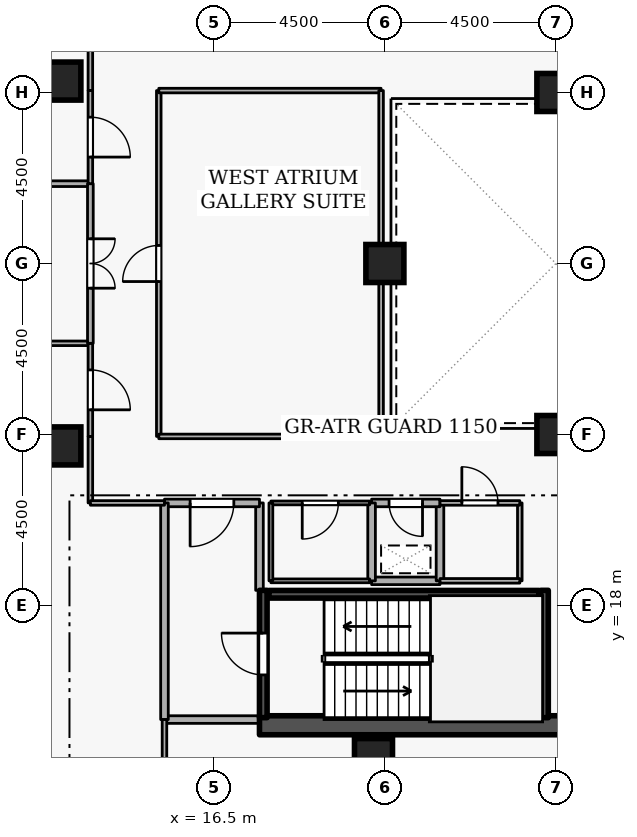
"""IFC4 building model, lengths in metres.
Left out: names, types, materials, properties, quantities, classifications, styles, units other than length and angle.
Written with IfcOpenShell. Run it as: python <this file> out.ifc"""

import sys

from ifc_helpers import new_model, si_unit, direction, frame, frame_2d, origin, origin_2d, place, context, subcontext, project, spatial, rectangle, extrude, element, fill, save


model = new_model("IFC4")
c1 = context("Model", 3, precision=1e-05, world=origin(), true_north=direction((0.0, 1.0)))
c2 = subcontext(c1, "Body", "Model", "MODEL_VIEW")
j1 = project(units=[si_unit("LENGTHUNIT", "METRE"), si_unit("PLANEANGLEUNIT", "RADIAN")], contexts=[c1])
p1 = place(None, origin())
s1 = spatial("IfcSite", under=j1, at=p1, CompositionType="ELEMENT")
p2 = place(p1, origin())
s2 = spatial("IfcBuilding", under=s1, at=p2, CompositionType="ELEMENT")
p3 = place(p2, frame((0.0, 0.0, 233.1)))
s3 = spatial("IfcBuildingStorey", under=s2, at=p3, CompositionType="ELEMENT", Elevation=233.1)
p4 = place(p3, frame((17.7, 14.85, 0.0), z_axis=(0.0, 0.0, 1.0), x_axis=(1.0, 0.0, 0.0)))
e1 = element("IfcWall", 1, at=p4, inside=s3, PredefinedType="SHEAR", context=c2, shape_type="SweptSolid", body=[
    extrude(rectangle(XDim=15.6, YDim=0.5, at=frame_2d((7.8, 0.0))), origin(), (0.0, 0.0, 1.0), 3.6),
])
for number, where, z_axis, x_axis in (
    (2, (12.5, 22.2, 0.0), (0.0, 0.0, 1.0), (1.0, 0.0, 0.0)),
    (3, (12.5, 31.8, 0.0), (0.0, 0.0, 1.0), (1.0, 0.0, 0.0)),
    (4, (20.7, 14.0, 0.0), (0.0, 0.0, 1.0), (1.0, 0.0, 0.0)),
    (5, (25.5, 22.5, 0.0), (0.0, 0.0, 1.0), (1.0, 0.0, 0.0)),
    (6, (25.5, 31.5, 0.0), (0.0, 0.0, 1.0), (1.0, 0.0, 0.0)),
    (7, (21.0, 27.0, 0.0), (0.0, 0.0, 1.0), (1.0, 0.0, 0.0)),
):
    element("IfcColumn", number, at=place(p3, frame(where, z_axis=z_axis, x_axis=x_axis)), inside=s3, PredefinedType="COLUMN", context=c2, shape_type="SweptSolid", body=[
        extrude(rectangle(XDim=1.0, YDim=1.0, at=origin_2d()), origin(), (0.0, 0.0, 1.0), 3.6),
    ])
p5 = place(p3, frame((17.8, 15.05, 0.0), z_axis=(0.0, 0.0, 1.0), x_axis=(0.0, 1.0, 0.0)))
e8 = element("IfcWall", 8, at=p5, inside=s3, PredefinedType="SHEAR", context=c2, shape_type="SweptSolid", body=[
    extrude(rectangle(XDim=3.35, YDim=0.2, at=frame_2d((1.675, 0.0))), origin(), (0.0, 0.0, 1.0), 3.6),
])
p6 = place(p5, frame((1.125, 0.0, 0.0)))
e9 = element("IfcOpeningElement", 9, at=p6, cuts=e8, PredefinedType="OPENING", context=c2, shape_type="SweptSolid", body=[
    extrude(rectangle(XDim=1.1, YDim=2.1, at=frame_2d((0.55, 1.05))), frame((0.0, 0.11, 0.0), z_axis=(0.0, -1.0, 0.0), x_axis=(1.0, 0.0, 0.0)), (0.0, 0.0, 1.0), 0.22),
])
p7 = place(p3, frame((25.2, 18.4, 0.0), z_axis=(0.0, 0.0, 1.0), x_axis=(0.0, -1.0, 0.0)))
e10 = element("IfcWall", 10, at=p7, inside=s3, PredefinedType="SHEAR", context=c2, shape_type="SweptSolid", body=[
    extrude(rectangle(XDim=3.35, YDim=0.2, at=frame_2d((1.675, 0.0))), origin(), (0.0, 0.0, 1.0), 3.6),
])
p8 = place(p3, frame((25.05, 18.297, 0.0), z_axis=(0.0, 0.0, 1.0), x_axis=(-1.0, 0.0, 0.0)))
e11 = element("IfcWall", 11, at=p8, inside=s3, PredefinedType="SHEAR", context=c2, shape_type="SweptSolid", body=[
    extrude(rectangle(XDim=7.1, YDim=0.2, at=frame_2d((3.55, 0.0))), origin(), (0.0, 0.0, 1.0), 3.6),
])
p9 = place(p3, frame((15.2, 15.0, 0.0), z_axis=(0.0, 0.0, 1.0), x_axis=(1.0, 0.0, 0.0)))
e12 = element("IfcWall", 12, at=p9, inside=s3, PredefinedType="STANDARD", context=c2, shape_type="SweptSolid", body=[
    extrude(rectangle(XDim=2.5, YDim=0.2, at=frame_2d((1.25, 0.0))), origin(), (0.0, 0.0, 1.0), 3.34),
])
p10 = place(p3, frame((17.7, 18.4, 0.0), z_axis=(0.0, 0.0, 1.0), x_axis=(0.0, 1.0, 0.0)))
e13 = element("IfcWall", 13, at=p10, inside=s3, PredefinedType="STANDARD", context=c2, shape_type="SweptSolid", body=[
    extrude(rectangle(XDim=2.3, YDim=0.2, at=frame_2d((1.15, 0.0))), origin(), (0.0, 0.0, 1.0), 2.545),
])
p11 = place(p3, frame((17.7, 20.7, 0.0), z_axis=(0.0, 0.0, 1.0), x_axis=(-1.0, 0.0, 0.0)))
e14 = element("IfcWall", 14, at=p11, inside=s3, PredefinedType="STANDARD", context=c2, shape_type="SweptSolid", body=[
    extrude(rectangle(XDim=2.5, YDim=0.2, at=frame_2d((1.25, 0.0))), origin(), (0.0, 0.0, 1.0), 3.34),
])
p12 = place(p11, frame((0.675, 0.0, 0.0)))
e15 = element("IfcOpeningElement", 15, at=p12, cuts=e14, PredefinedType="OPENING", context=c2, shape_type="SweptSolid", body=[
    extrude(rectangle(XDim=1.15, YDim=2.1, at=frame_2d((0.575, 1.05))), frame((0.0, 0.11, 0.0), z_axis=(0.0, -1.0, 0.0), x_axis=(1.0, 0.0, 0.0)), (0.0, 0.0, 1.0), 0.22),
])
p13 = place(p3, frame((15.2, 20.7, 0.0), z_axis=(0.0, 0.0, 1.0), x_axis=(0.0, -1.0, 0.0)))
e16 = element("IfcWall", 16, at=p13, inside=s3, PredefinedType="STANDARD", context=c2, shape_type="SweptSolid", body=[
    extrude(rectangle(XDim=5.7, YDim=0.2, at=frame_2d((2.85, 0.0))), origin(), (0.0, 0.0, 1.0), 3.34),
])
p14 = place(p3, frame((20.65, 18.65, 0.0), z_axis=(0.0, 0.0, 1.0), x_axis=(1.0, 0.0, 0.0)))
e17 = element("IfcWall", 17, at=p14, inside=s3, PredefinedType="STANDARD", context=c2, shape_type="SweptSolid", body=[
    extrude(rectangle(XDim=1.8, YDim=0.2, at=frame_2d((0.9, 0.0))), origin(), (0.0, 0.0, 1.0), 3.34),
])
p15 = place(p3, frame((22.45, 18.65, 0.0), z_axis=(0.0, 0.0, 1.0), x_axis=(0.0, 1.0, 0.0)))
e18 = element("IfcWall", 18, at=p15, inside=s3, PredefinedType="STANDARD", context=c2, shape_type="SweptSolid", body=[
    extrude(rectangle(XDim=2.05, YDim=0.2, at=frame_2d((1.025, 0.0))), origin(), (0.0, 0.0, 1.0), 3.34),
])
p16 = place(p3, frame((22.45, 20.7, 0.0), z_axis=(0.0, 0.0, 1.0), x_axis=(-1.0, 0.0, 0.0)))
e19 = element("IfcWall", 19, at=p16, inside=s3, PredefinedType="STANDARD", context=c2, shape_type="SweptSolid", body=[
    extrude(rectangle(XDim=1.8, YDim=0.2, at=frame_2d((0.9, 0.0))), origin(), (0.0, 0.0, 1.0), 3.34),
])
p17 = place(p16, frame((0.46, 0.0, 0.0)))
e20 = element("IfcOpeningElement", 20, at=p17, cuts=e19, PredefinedType="OPENING", context=c2, shape_type="SweptSolid", body=[
    extrude(rectangle(XDim=0.88, YDim=2.04, at=frame_2d((0.44, 1.02))), frame((0.0, 0.11, 0.0), z_axis=(0.0, -1.0, 0.0), x_axis=(1.0, 0.0, 0.0)), (0.0, 0.0, 1.0), 0.22),
])
p18 = place(p3, frame((20.65, 20.7, 0.0), z_axis=(0.0, 0.0, 1.0), x_axis=(0.0, -1.0, 0.0)))
e21 = element("IfcWall", 21, at=p18, inside=s3, PredefinedType="STANDARD", context=c2, shape_type="SweptSolid", body=[
    extrude(rectangle(XDim=2.05, YDim=0.2, at=frame_2d((1.025, 0.0))), origin(), (0.0, 0.0, 1.0), 3.34),
])
p19 = place(p3, frame((18.0, 18.65, 0.0), z_axis=(0.0, 0.0, 1.0), x_axis=(1.0, 0.0, 0.0)))
e22 = element("IfcWall", 22, at=p19, inside=s3, PredefinedType="PARTITIONING", context=c2, shape_type="SweptSolid", body=[
    extrude(rectangle(XDim=2.6, YDim=0.1, at=frame_2d((1.3, 0.0))), origin(), (0.0, 0.0, 1.0), 3.34),
])
p20 = place(p3, frame((20.6, 20.7, 0.0), z_axis=(0.0, 0.0, 1.0), x_axis=(-1.0, 0.0, 0.0)))
e23 = element("IfcWall", 23, at=p20, inside=s3, PredefinedType="PARTITIONING", context=c2, shape_type="SweptSolid", body=[
    extrude(rectangle(XDim=2.6, YDim=0.1, at=frame_2d((1.3, 0.0))), origin(), (0.0, 0.0, 1.0), 3.34),
])
p21 = place(p20, frame((0.825, 0.0, 0.0)))
e24 = element("IfcOpeningElement", 24, at=p21, cuts=e23, PredefinedType="OPENING", context=c2, shape_type="SweptSolid", body=[
    extrude(rectangle(XDim=0.95, YDim=2.1, at=frame_2d((0.475, 1.05))), frame((0.0, 0.06, 0.0), z_axis=(0.0, -1.0, 0.0), x_axis=(1.0, 0.0, 0.0)), (0.0, 0.0, 1.0), 0.12),
])
p22 = place(p3, frame((18.0, 20.7, 0.0), z_axis=(0.0, 0.0, 1.0), x_axis=(0.0, -1.0, 0.0)))
e25 = element("IfcWall", 25, at=p22, inside=s3, PredefinedType="PARTITIONING", context=c2, shape_type="SweptSolid", body=[
    extrude(rectangle(XDim=2.05, YDim=0.1, at=frame_2d((1.025, 0.0))), origin(), (0.0, 0.0, 1.0), 2.545),
])
p23 = place(p3, frame((24.55, 20.7, 0.0), z_axis=(0.0, 0.0, 1.0), x_axis=(0.0, -1.0, 0.0)))
e26 = element("IfcWall", 26, at=p23, inside=s3, PredefinedType="PARTITIONING", context=c2, shape_type="SweptSolid", body=[
    extrude(rectangle(XDim=2.05, YDim=0.12, at=frame_2d((1.025, 0.0))), origin(), (0.0, 0.0, 1.0), 3.34),
])
p24 = place(p3, frame((24.55, 18.65, 0.0), z_axis=(0.0, 0.0, 1.0), x_axis=(-1.0, 0.0, 0.0)))
e27 = element("IfcWall", 27, at=p24, inside=s3, PredefinedType="PARTITIONING", context=c2, shape_type="SweptSolid", body=[
    extrude(rectangle(XDim=2.1, YDim=0.12, at=frame_2d((1.05, 0.0))), origin(), (0.0, 0.0, 1.0), 3.34),
])
p25 = place(p3, frame((22.45, 20.7, 0.0), z_axis=(0.0, 0.0, 1.0), x_axis=(1.0, 0.0, 0.0)))
e28 = element("IfcWall", 28, at=p25, inside=s3, PredefinedType="PARTITIONING", context=c2, shape_type="SweptSolid", body=[
    extrude(rectangle(XDim=2.1, YDim=0.12, at=frame_2d((1.05, 0.0))), origin(), (0.0, 0.0, 1.0), 3.34),
])
p26 = place(p25, frame((0.575, 0.0, 0.0)))
e29 = element("IfcOpeningElement", 29, at=p26, cuts=e28, PredefinedType="OPENING", context=c2, shape_type="SweptSolid", body=[
    extrude(rectangle(XDim=0.95, YDim=2.1, at=frame_2d((0.475, 1.05))), frame((0.0, 0.07, 0.0), z_axis=(0.0, -1.0, 0.0), x_axis=(1.0, 0.0, 0.0)), (0.0, 0.0, 1.0), 0.14),
])
p27 = place(p3, frame((13.25, 22.45, 0.0), z_axis=(0.0, 0.0, 1.0), x_axis=(0.0, -1.0, 0.0)))
e30 = element("IfcWall", 30, at=p27, inside=s3, PredefinedType="PARTITIONING", context=c2, shape_type="SweptSolid", body=[
    extrude(rectangle(XDim=1.75, YDim=0.12, at=frame_2d((0.875, 0.0))), origin(), (0.0, 0.0, 1.0), 3.34),
])
p28 = place(p3, frame((13.25, 20.7, 0.0), z_axis=(0.0, 0.0, 1.0), x_axis=(1.0, 0.0, 0.0)))
e31 = element("IfcWall", 31, at=p28, inside=s3, PredefinedType="PARTITIONING", context=c2, shape_type="SweptSolid", body=[
    extrude(rectangle(XDim=1.95, YDim=0.12, at=frame_2d((0.975, 0.0))), origin(), (0.0, 0.0, 1.0), 3.34),
])
p29 = place(p3, frame((15.2, 15.0, 0.0), z_axis=(0.0, 0.0, 1.0), x_axis=(0.0, -1.0, 0.0)))
e32 = element("IfcWall", 32, at=p29, inside=s3, PredefinedType="PARTITIONING", context=c2, shape_type="SweptSolid", body=[
    extrude(rectangle(XDim=11.72, YDim=0.12, at=frame_2d((5.86, 0.0))), origin(), (0.0, 0.0, 1.0), 3.34),
])
p30 = place(p3, frame((1.78, 24.9, 0.0), z_axis=(0.0, 0.0, 1.0), x_axis=(1.0, 0.0, 0.0)))
e33 = element("IfcWall", 33, at=p30, inside=s3, PredefinedType="PARTITIONING", context=c2, shape_type="SweptSolid", body=[
    extrude(rectangle(XDim=11.47, YDim=0.12, at=frame_2d((5.735, 0.0))), origin(), (0.0, 0.0, 1.0), 3.34),
])
p31 = place(p3, frame((13.25, 24.9, 0.0), z_axis=(0.0, 0.0, 1.0), x_axis=(0.0, -1.0, 0.0)))
e34 = element("IfcWall", 34, at=p31, inside=s3, PredefinedType="PARTITIONING", context=c2, shape_type="SweptSolid", body=[
    extrude(rectangle(XDim=2.45, YDim=0.12, at=frame_2d((1.225, 0.0))), origin(), (0.0, 0.0, 1.0), 3.34),
])
p32 = place(p31, frame((0.7, 0.0, 0.0)))
e35 = element("IfcOpeningElement", 35, at=p32, cuts=e34, PredefinedType="OPENING", context=c2, shape_type="SweptSolid", body=[
    extrude(rectangle(XDim=1.05, YDim=2.1, at=frame_2d((0.525, 1.05))), frame((0.0, 0.07, 0.0), z_axis=(0.0, -1.0, 0.0), x_axis=(1.0, 0.0, 0.0)), (0.0, 0.0, 1.0), 0.14),
])
p33 = place(p3, frame((1.78, 29.1, 0.0), z_axis=(0.0, 0.0, 1.0), x_axis=(1.0, 0.0, 0.0)))
e36 = element("IfcWall", 36, at=p33, inside=s3, PredefinedType="PARTITIONING", context=c2, shape_type="SweptSolid", body=[
    extrude(rectangle(XDim=11.47, YDim=0.15, at=frame_2d((5.735, 0.0))), origin(), (0.0, 0.0, 1.0), 3.34),
])
p34 = place(p3, frame((13.25, 29.1, 0.0), z_axis=(0.0, 0.0, 1.0), x_axis=(0.0, -1.0, 0.0)))
e37 = element("IfcWall", 37, at=p34, inside=s3, PredefinedType="PARTITIONING", context=c2, shape_type="SweptSolid", body=[
    extrude(rectangle(XDim=4.2, YDim=0.15, at=frame_2d((2.1, 0.0))), origin(), (0.0, 0.0, 1.0), 3.34),
])
p35 = place(p34, frame((1.45, 0.0, 0.0)))
e38 = element("IfcOpeningElement", 38, at=p35, cuts=e37, PredefinedType="OPENING", context=c2, shape_type="SweptSolid", body=[
    extrude(rectangle(XDim=1.3, YDim=2.12, at=frame_2d((0.65, 1.06))), frame((0.0, 0.085, 0.0), z_axis=(0.0, -1.0, 0.0), x_axis=(1.0, 0.0, 0.0)), (0.0, 0.0, 1.0), 0.17),
])
p36 = place(p3, frame((13.25, 33.3, 0.0), z_axis=(0.0, 0.0, 1.0), x_axis=(0.0, -1.0, 0.0)))
e39 = element("IfcWall", 39, at=p36, inside=s3, PredefinedType="PARTITIONING", context=c2, shape_type="SweptSolid", body=[
    extrude(rectangle(XDim=1.75, YDim=0.12, at=frame_2d((0.875, 0.0))), origin(), (0.0, 0.0, 1.0), 3.34),
])
p37 = place(p3, frame((13.25, 31.55, 0.0), z_axis=(0.0, 0.0, 1.0), x_axis=(0.0, -1.0, 0.0)))
e40 = element("IfcWall", 40, at=p37, inside=s3, PredefinedType="PARTITIONING", context=c2, shape_type="SweptSolid", body=[
    extrude(rectangle(XDim=2.45, YDim=0.12, at=frame_2d((1.225, 0.0))), origin(), (0.0, 0.0, 1.0), 3.34),
])
p38 = place(p37, frame((0.7, 0.0, 0.0)))
e41 = element("IfcOpeningElement", 41, at=p38, cuts=e40, PredefinedType="OPENING", context=c2, shape_type="SweptSolid", body=[
    extrude(rectangle(XDim=1.05, YDim=2.1, at=frame_2d((0.525, 1.05))), frame((0.0, 0.07, 0.0), z_axis=(0.0, -1.0, 0.0), x_axis=(1.0, 0.0, 0.0)), (0.0, 0.0, 1.0), 0.14),
])
p39 = place(p3, frame((15.05, 22.45, 0.0), z_axis=(0.0, 0.0, 1.0), x_axis=(0.0, 1.0, 0.0)))
e42 = element("IfcWall", 42, at=p39, inside=s3, PredefinedType="PARTITIONING", context=c2, shape_type="SweptSolid", body=[
    extrude(rectangle(XDim=9.1, YDim=0.12, at=frame_2d((4.55, 0.0))), origin(), (0.0, 0.0, 1.0), 3.34),
])
p40 = place(p39, frame((4.075, 0.0, 0.0)))
e43 = element("IfcOpeningElement", 43, at=p40, cuts=e42, PredefinedType="OPENING", context=c2, shape_type="SweptSolid", body=[
    extrude(rectangle(XDim=0.95, YDim=2.1, at=frame_2d((0.475, 1.05))), frame((0.0, 0.07, 0.0), z_axis=(0.0, -1.0, 0.0), x_axis=(1.0, 0.0, 0.0)), (0.0, 0.0, 1.0), 0.14),
])
p41 = place(p3, frame((15.05, 31.55, 0.0), z_axis=(0.0, 0.0, 1.0), x_axis=(1.0, 0.0, 0.0)))
e44 = element("IfcWall", 44, at=p41, inside=s3, PredefinedType="PARTITIONING", context=c2, shape_type="SweptSolid", body=[
    extrude(rectangle(XDim=5.85, YDim=0.12, at=frame_2d((2.925, 0.0))), origin(), (0.0, 0.0, 1.0), 3.34),
])
p42 = place(p3, frame((20.9, 31.55, 0.0), z_axis=(0.0, 0.0, 1.0), x_axis=(0.0, -1.0, 0.0)))
e45 = element("IfcWall", 45, at=p42, inside=s3, PredefinedType="PARTITIONING", context=c2, shape_type="SweptSolid", body=[
    extrude(rectangle(XDim=9.1, YDim=0.12, at=frame_2d((4.55, 0.0))), origin(), (0.0, 0.0, 1.0), 3.34),
])
p43 = place(p3, frame((20.9, 22.45, 0.0), z_axis=(0.0, 0.0, 1.0), x_axis=(-1.0, 0.0, 0.0)))
e46 = element("IfcWall", 46, at=p43, inside=s3, PredefinedType="PARTITIONING", context=c2, shape_type="SweptSolid", body=[
    extrude(rectangle(XDim=5.85, YDim=0.12, at=frame_2d((2.925, 0.0))), origin(), (0.0, 0.0, 1.0), 3.34),
])
p44 = place(p6, origin())
e47 = element("IfcDoor", 47, at=p44, inside=s3, OperationType="SINGLE_SWING_RIGHT", PredefinedType="DOOR", context=c2, shape_type="SweptSolid", body=[
    extrude(rectangle(XDim=1.1, YDim=2.1, at=frame_2d((0.55, 1.05))), frame((0.0, 0.025, 0.0), z_axis=(0.0, -1.0, 0.0), x_axis=(1.0, 0.0, 0.0)), (0.0, 0.0, 1.0), 0.05),
])
fill(e9, e47)
p45 = place(p12, origin())
e48 = element("IfcDoor", 48, at=p45, inside=s3, OperationType="SINGLE_SWING_RIGHT", PredefinedType="DOOR", context=c2, shape_type="SweptSolid", body=[
    extrude(rectangle(XDim=1.15, YDim=2.1, at=frame_2d((0.575, 1.05))), frame((0.0, 0.025, 0.0), z_axis=(0.0, -1.0, 0.0), x_axis=(1.0, 0.0, 0.0)), (0.0, 0.0, 1.0), 0.05),
])
fill(e15, e48)
p46 = place(p17, origin())
e49 = element("IfcDoor", 49, at=p46, inside=s3, OperationType="SINGLE_SWING_LEFT", PredefinedType="DOOR", context=c2, shape_type="SweptSolid", body=[
    extrude(rectangle(XDim=0.88, YDim=2.04, at=frame_2d((0.44, 1.02))), frame((0.0, 0.025, 0.0), z_axis=(0.0, -1.0, 0.0), x_axis=(1.0, 0.0, 0.0)), (0.0, 0.0, 1.0), 0.05),
])
fill(e20, e49)
p47 = place(p21, origin())
e50 = element("IfcDoor", 50, at=p47, inside=s3, OperationType="SINGLE_SWING_RIGHT", PredefinedType="DOOR", context=c2, shape_type="SweptSolid", body=[
    extrude(rectangle(XDim=0.95, YDim=2.1, at=frame_2d((0.475, 1.05))), frame((0.0, 0.025, 0.0), z_axis=(0.0, -1.0, 0.0), x_axis=(1.0, 0.0, 0.0)), (0.0, 0.0, 1.0), 0.05),
])
fill(e24, e50)
p48 = place(p26, origin())
e51 = element("IfcDoor", 51, at=p48, inside=s3, OperationType="SINGLE_SWING_LEFT", PredefinedType="DOOR", context=c2, shape_type="SweptSolid", body=[
    extrude(rectangle(XDim=0.95, YDim=2.1, at=frame_2d((0.475, 1.05))), frame((0.0, 0.025, 0.0), z_axis=(0.0, -1.0, 0.0), x_axis=(1.0, 0.0, 0.0)), (0.0, 0.0, 1.0), 0.05),
])
fill(e29, e51)
p49 = place(p32, origin())
e52 = element("IfcDoor", 52, at=p49, inside=s3, OperationType="SINGLE_SWING_RIGHT", PredefinedType="DOOR", context=c2, shape_type="SweptSolid", body=[
    extrude(rectangle(XDim=1.05, YDim=2.1, at=frame_2d((0.525, 1.05))), frame((0.0, 0.025, 0.0), z_axis=(0.0, -1.0, 0.0), x_axis=(1.0, 0.0, 0.0)), (0.0, 0.0, 1.0), 0.05),
])
fill(e35, e52)
p50 = place(p35, origin())
e53 = element("IfcDoor", 53, at=p50, inside=s3, OperationType="DOUBLE_DOOR_SINGLE_SWING", PredefinedType="DOOR", context=c2, shape_type="SweptSolid", body=[
    extrude(rectangle(XDim=1.3, YDim=2.12, at=frame_2d((0.65, 1.06))), frame((0.0, 0.025, 0.0), z_axis=(0.0, -1.0, 0.0), x_axis=(1.0, 0.0, 0.0)), (0.0, 0.0, 1.0), 0.05),
])
fill(e38, e53)
p51 = place(p38, origin())
e54 = element("IfcDoor", 54, at=p51, inside=s3, OperationType="SINGLE_SWING_RIGHT", PredefinedType="DOOR", context=c2, shape_type="SweptSolid", body=[
    extrude(rectangle(XDim=1.05, YDim=2.1, at=frame_2d((0.525, 1.05))), frame((0.0, 0.025, 0.0), z_axis=(0.0, -1.0, 0.0), x_axis=(1.0, 0.0, 0.0)), (0.0, 0.0, 1.0), 0.05),
])
fill(e41, e54)
p52 = place(p40, origin())
e55 = element("IfcDoor", 55, at=p52, inside=s3, OperationType="SINGLE_SWING_LEFT", PredefinedType="DOOR", context=c2, shape_type="SweptSolid", body=[
    extrude(rectangle(XDim=0.95, YDim=2.1, at=frame_2d((0.475, 1.05))), frame((0.0, 0.025, 0.0), z_axis=(0.0, -1.0, 0.0), x_axis=(1.0, 0.0, 0.0)), (0.0, 0.0, 1.0), 0.05),
])
fill(e43, e55)
save(model, sys.argv[1])
